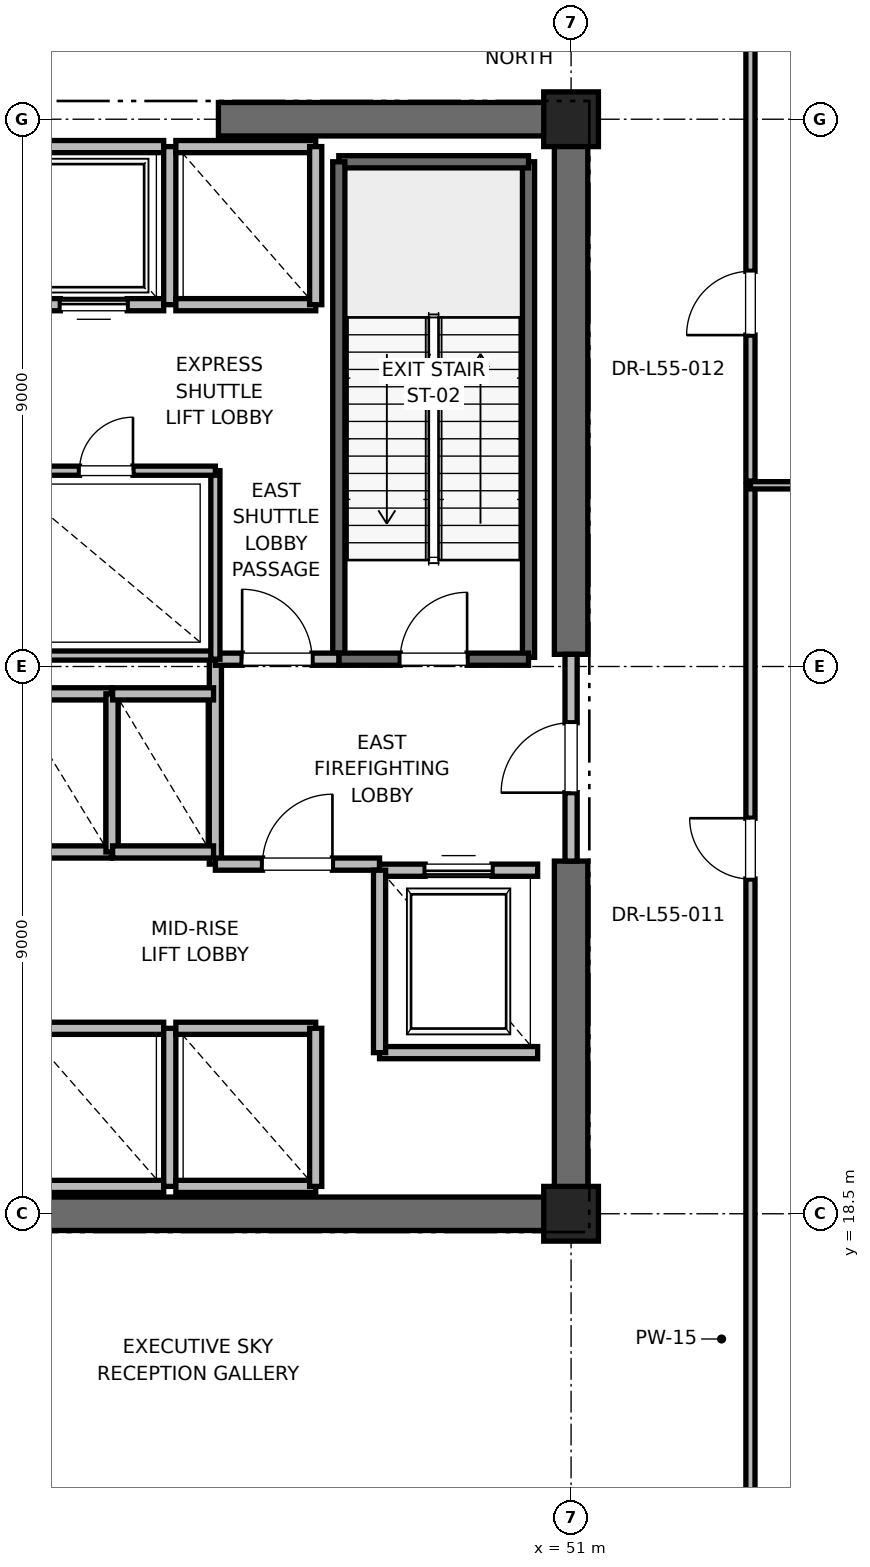
"""IFC4 building model, lengths in metres.
Left out: names, types, materials, properties, quantities, classifications, styles, units other than length and angle.
Written with IfcOpenShell. Run it as: python <this file> out.ifc"""

import sys

from ifc_helpers import new_model, si_unit, direction, frame, frame_2d, origin, origin_2d, place, context, subcontext, project, spatial, rectangle, extrude, element, fill, save


model = new_model("IFC4")
c1 = context("Model", 3, precision=1e-05, world=origin(), true_north=direction((0.0, 1.0)))
c2 = subcontext(c1, "Body", "Model", "MODEL_VIEW")
j1 = project(units=[si_unit("LENGTHUNIT", "METRE"), si_unit("PLANEANGLEUNIT", "RADIAN")], contexts=[c1])
p1 = place(None, origin())
s1 = spatial("IfcSite", under=j1, at=p1, CompositionType="ELEMENT")
p2 = place(p1, origin())
s2 = spatial("IfcBuilding", under=s1, at=p2, CompositionType="ELEMENT")
p3 = place(p2, frame((0.0, 0.0, 238.2)))
s3 = spatial("IfcBuildingStorey", under=s2, at=p3, CompositionType="ELEMENT", Elevation=238.2)
for number, where, z_axis, x_axis in (
    (1, (51.0, 18.5, 0.0), (0.0, 0.0, 1.0), (1.0, 0.0, 0.0)),
    (2, (51.0, 36.5, 0.0), (0.0, 0.0, 1.0), (1.0, 0.0, 0.0)),
):
    element("IfcColumn", number, at=place(p3, frame(where, z_axis=z_axis, x_axis=x_axis)), inside=s3, PredefinedType="PILASTER", context=c2, shape_type="SweptSolid", body=[
        extrude(rectangle(XDim=0.9, YDim=0.9, at=origin_2d()), origin(), (0.0, 0.0, 1.0), 5.0),
    ])
p4 = place(p3, frame((41.8, 18.5, 0.0), z_axis=(0.0, 0.0, 1.0), x_axis=(1.0, 0.0, 0.0)))
e3 = element("IfcWall", 3, at=p4, inside=s3, PredefinedType="SHEAR", context=c2, shape_type="SweptSolid", body=[
    extrude(rectangle(XDim=9.2, YDim=0.55, at=frame_2d((4.6, 0.0))), origin(), (0.0, 0.0, 1.0), 4.785),
])
for number, where, z_axis, x_axis in (
    (4, (45.2, 36.5, 0.0), (0.0, 0.0, 1.0), (1.0, 0.0, 0.0)),
    (5, (51.0, 18.5, 0.0), (0.0, 0.0, 1.0), (0.0, 1.0, 0.0)),
):
    element("IfcWall", number, at=place(p3, frame(where, z_axis=z_axis, x_axis=x_axis)), inside=s3, PredefinedType="SHEAR", context=c2, shape_type="SweptSolid", body=[
        extrude(rectangle(XDim=5.8, YDim=0.55, at=frame_2d((2.9, 0.0))), origin(), (0.0, 0.0, 1.0), 4.785),
    ])
p5 = place(p3, frame((51.0, 27.7, 0.0), z_axis=(0.0, 0.0, 1.0), x_axis=(0.0, 1.0, 0.0)))
e6 = element("IfcWall", 6, at=p5, inside=s3, PredefinedType="SHEAR", context=c2, shape_type="SweptSolid", body=[
    extrude(rectangle(XDim=8.8, YDim=0.55, at=frame_2d((4.4, 0.0))), origin(), (0.0, 0.0, 1.0), 4.785),
])
p6 = place(p3, frame((50.3, 27.65, 0.0), z_axis=(0.0, 0.0, 1.0), x_axis=(0.0, 1.0, 0.0)))
e7 = element("IfcWall", 7, at=p6, inside=s3, PredefinedType="SOLIDWALL", context=c2, shape_type="SweptSolid", body=[
    extrude(rectangle(XDim=8.15, YDim=0.2, at=frame_2d((4.075, 0.0))), origin(), (0.0, 0.0, 1.0), 4.785),
])
p7 = place(p3, frame((47.18, 35.8, 0.0), z_axis=(0.0, 0.0, 1.0), x_axis=(1.0, 0.0, 0.0)))
e8 = element("IfcWall", 8, at=p7, inside=s3, PredefinedType="SOLIDWALL", context=c2, shape_type="SweptSolid", body=[
    extrude(rectangle(XDim=3.12, YDim=0.2, at=frame_2d((1.56, 0.0))), origin(), (0.0, 0.0, 1.0), 4.785),
])
p8 = place(p3, frame((47.18, 27.62, 0.0), z_axis=(0.0, 0.0, 1.0), x_axis=(0.0, 1.0, 0.0)))
e9 = element("IfcWall", 9, at=p8, inside=s3, PredefinedType="SOLIDWALL", context=c2, shape_type="SweptSolid", body=[
    extrude(rectangle(XDim=8.18, YDim=0.2, at=frame_2d((4.09, 0.0))), origin(), (0.0, 0.0, 1.0), 4.785),
])
p9 = place(p3, frame((47.18, 27.62, 0.0), z_axis=(0.0, 0.0, 1.0), x_axis=(1.0, 0.0, 0.0)))
e10 = element("IfcWall", 10, at=p9, inside=s3, PredefinedType="SOLIDWALL", context=c2, shape_type="SweptSolid", body=[
    extrude(rectangle(XDim=3.12, YDim=0.2, at=frame_2d((1.56, 0.0))), origin(), (0.0, 0.0, 1.0), 4.785),
])
p10 = place(p9, frame((1.01, 0.0, 0.0)))
e11 = element("IfcOpeningElement", 11, at=p10, cuts=e10, PredefinedType="OPENING", context=c2, shape_type="SweptSolid", body=[
    extrude(rectangle(XDim=1.1, YDim=2.15, at=frame_2d((0.55, 1.075))), frame((0.0, 0.1, 0.0), z_axis=(0.0, -1.0, 0.0), x_axis=(1.0, 0.0, 0.0)), (0.0, 0.0, 1.0), 0.2),
])
p11 = place(p3, frame((45.15, 24.25, 0.0), z_axis=(0.0, 0.0, 1.0), x_axis=(0.0, 1.0, 0.0)))
e12 = element("IfcWall", 12, at=p11, inside=s3, PredefinedType="PARTITIONING", context=c2, shape_type="SweptSolid", body=[
    extrude(rectangle(XDim=3.37, YDim=0.2, at=frame_2d((1.685, 0.0))), origin(), (0.0, 0.0, 1.0), 4.785),
])
p12 = place(p3, frame((45.15, 24.25, 0.0), z_axis=(0.0, 0.0, 1.0), x_axis=(1.0, 0.0, 0.0)))
e13 = element("IfcWall", 13, at=p12, inside=s3, PredefinedType="PARTITIONING", context=c2, shape_type="SweptSolid", body=[
    extrude(rectangle(XDim=2.7, YDim=0.2, at=frame_2d((1.35, 0.0))), origin(), (0.0, 0.0, 1.0), 4.785),
])
p13 = place(p12, frame((0.775, 0.0, 0.0)))
e14 = element("IfcOpeningElement", 14, at=p13, cuts=e13, PredefinedType="OPENING", context=c2, shape_type="SweptSolid", body=[
    extrude(rectangle(XDim=1.15, YDim=2.2, at=frame_2d((0.575, 1.1))), frame((0.0, 0.1, 0.0), z_axis=(0.0, -1.0, 0.0), x_axis=(1.0, 0.0, 0.0)), (0.0, 0.0, 1.0), 0.2),
])
p14 = place(p3, frame((45.15, 27.62, 0.0), z_axis=(0.0, 0.0, 1.0), x_axis=(1.0, 0.0, 0.0)))
e15 = element("IfcWall", 15, at=p14, inside=s3, PredefinedType="PARTITIONING", context=c2, shape_type="SweptSolid", body=[
    extrude(rectangle(XDim=2.03, YDim=0.2, at=frame_2d((1.015, 0.0))), origin(), (0.0, 0.0, 1.0), 4.785),
])
p15 = place(p14, frame((0.44, 0.0, 0.0)))
e16 = element("IfcOpeningElement", 16, at=p15, cuts=e15, PredefinedType="OPENING", context=c2, shape_type="SweptSolid", body=[
    extrude(rectangle(XDim=1.15, YDim=2.2, at=frame_2d((0.575, 1.1))), frame((0.0, 0.1, 0.0), z_axis=(0.0, -1.0, 0.0), x_axis=(1.0, 0.0, 0.0)), (0.0, 0.0, 1.0), 0.2),
])
p16 = place(p3, frame((51.0, 24.3, 0.0), z_axis=(0.0, 0.0, 1.0), x_axis=(0.0, 1.0, 0.0)))
e17 = element("IfcWall", 17, at=p16, inside=s3, PredefinedType="PARTITIONING", context=c2, shape_type="SweptSolid", body=[
    extrude(rectangle(XDim=3.4, YDim=0.2, at=frame_2d((1.7, 0.0))), origin(), (0.0, 0.0, 1.0), 3.765),
])
p17 = place(p16, frame((1.125, 0.0, 0.0)))
e18 = element("IfcOpeningElement", 18, at=p17, cuts=e17, PredefinedType="OPENING", context=c2, shape_type="SweptSolid", body=[
    extrude(rectangle(XDim=1.15, YDim=2.2, at=frame_2d((0.575, 1.1))), frame((0.0, 0.1, 0.0), z_axis=(0.0, -1.0, 0.0), x_axis=(1.0, 0.0, 0.0)), (0.0, 0.0, 1.0), 0.2),
])
p18 = place(p3, frame((47.85, 21.15, 0.0), z_axis=(0.0, 0.0, 1.0), x_axis=(1.0, 0.0, 0.0)))
e19 = element("IfcWall", 19, at=p18, inside=s3, PredefinedType="SOLIDWALL", context=c2, shape_type="SweptSolid", body=[
    extrude(rectangle(XDim=2.6, YDim=0.2, at=frame_2d((1.3, 0.0))), origin(), (0.0, 0.0, 1.0), 4.785),
])
p19 = place(p3, frame((50.45, 24.15, 0.0), z_axis=(0.0, 0.0, 1.0), x_axis=(-1.0, 0.0, 0.0)))
e20 = element("IfcWall", 20, at=p19, inside=s3, PredefinedType="SOLIDWALL", context=c2, shape_type="SweptSolid", body=[
    extrude(rectangle(XDim=2.6, YDim=0.2, at=frame_2d((1.3, 0.0))), origin(), (0.0, 0.0, 1.0), 3.765),
])
p20 = place(p19, frame((0.75, 0.0, 0.0)))
e21 = element("IfcOpeningElement", 21, at=p20, cuts=e20, PredefinedType="OPENING", context=c2, shape_type="SweptSolid", body=[
    extrude(rectangle(XDim=1.1, YDim=2.2, at=frame_2d((0.55, 1.1))), frame((0.0, 0.1, 0.0), z_axis=(0.0, -1.0, 0.0), x_axis=(1.0, 0.0, 0.0)), (0.0, 0.0, 1.0), 0.2),
])
p21 = place(p3, frame((47.85, 24.15, 0.0), z_axis=(0.0, 0.0, 1.0), x_axis=(0.0, -1.0, 0.0)))
e22 = element("IfcWall", 22, at=p21, inside=s3, PredefinedType="SOLIDWALL", context=c2, shape_type="SweptSolid", body=[
    extrude(rectangle(XDim=3.0, YDim=0.2, at=frame_2d((1.5, 0.0))), origin(), (0.0, 0.0, 1.0), 4.785),
])
p22 = place(p3, frame((42.0, 18.95, 0.0), z_axis=(0.0, 0.0, 1.0), x_axis=(1.0, 0.0, 0.0)))
e23 = element("IfcWall", 23, at=p22, inside=s3, PredefinedType="SOLIDWALL", context=c2, shape_type="SweptSolid", body=[
    extrude(rectangle(XDim=2.3, YDim=0.2, at=frame_2d((1.15, 0.0))), origin(), (0.0, 0.0, 1.0), 3.765),
])
p23 = place(p3, frame((44.3, 21.55, 0.0), z_axis=(0.0, 0.0, 1.0), x_axis=(-1.0, 0.0, 0.0)))
e24 = element("IfcWall", 24, at=p23, inside=s3, PredefinedType="SOLIDWALL", context=c2, shape_type="SweptSolid", body=[
    extrude(rectangle(XDim=2.3, YDim=0.2, at=frame_2d((1.15, 0.0))), origin(), (0.0, 0.0, 1.0), 4.785),
])
p24 = place(p3, frame((44.4, 18.95, 0.0), z_axis=(0.0, 0.0, 1.0), x_axis=(0.0, 1.0, 0.0)))
e25 = element("IfcWall", 25, at=p24, inside=s3, PredefinedType="SOLIDWALL", context=c2, shape_type="SweptSolid", body=[
    extrude(rectangle(XDim=2.6, YDim=0.2, at=frame_2d((1.3, 0.0))), origin(), (0.0, 0.0, 1.0), 4.785),
])
for number, where, z_axis, x_axis in (
    (26, (44.5, 18.95, 0.0), (0.0, 0.0, 1.0), (1.0, 0.0, 0.0)),
    (27, (46.8, 21.55, 0.0), (0.0, 0.0, 1.0), (-1.0, 0.0, 0.0)),
):
    element("IfcWall", number, at=place(p3, frame(where, z_axis=z_axis, x_axis=x_axis)), inside=s3, PredefinedType="SOLIDWALL", context=c2, shape_type="SweptSolid", body=[
        extrude(rectangle(XDim=2.3, YDim=0.2, at=frame_2d((1.15, 0.0))), origin(), (0.0, 0.0, 1.0), 4.785),
    ])
p25 = place(p3, frame((46.8, 18.95, 0.0), z_axis=(0.0, 0.0, 1.0), x_axis=(0.0, 1.0, 0.0)))
e28 = element("IfcWall", 28, at=p25, inside=s3, PredefinedType="SOLIDWALL", context=c2, shape_type="SweptSolid", body=[
    extrude(rectangle(XDim=2.6, YDim=0.2, at=frame_2d((1.3, 0.0))), origin(), (0.0, 0.0, 1.0), 4.785),
])
for number, where, z_axis, x_axis in (
    (29, (41.76, 24.45, 0.0), (0.0, 0.0, 1.0), (1.0, 0.0, 0.0)),
    (30, (43.44, 27.05, 0.0), (0.0, 0.0, 1.0), (-1.0, 0.0, 0.0)),
):
    element("IfcWall", number, at=place(p3, frame(where, z_axis=z_axis, x_axis=x_axis)), inside=s3, PredefinedType="SOLIDWALL", context=c2, shape_type="SweptSolid", body=[
        extrude(rectangle(XDim=1.68, YDim=0.2, at=frame_2d((0.84, 0.0))), origin(), (0.0, 0.0, 1.0), 4.785),
    ])
p26 = place(p3, frame((43.45, 24.45, 0.0), z_axis=(0.0, 0.0, 1.0), x_axis=(0.0, 1.0, 0.0)))
e31 = element("IfcWall", 31, at=p26, inside=s3, PredefinedType="SOLIDWALL", context=c2, shape_type="SweptSolid", body=[
    extrude(rectangle(XDim=2.6, YDim=0.2, at=frame_2d((1.3, 0.0))), origin(), (0.0, 0.0, 1.0), 4.785),
])
for number, where, z_axis, x_axis in (
    (32, (43.46, 24.45, 0.0), (0.0, 0.0, 1.0), (1.0, 0.0, 0.0)),
    (33, (45.12, 27.05, 0.0), (0.0, 0.0, 1.0), (-1.0, 0.0, 0.0)),
):
    element("IfcWall", number, at=place(p3, frame(where, z_axis=z_axis, x_axis=x_axis)), inside=s3, PredefinedType="SOLIDWALL", context=c2, shape_type="SweptSolid", body=[
        extrude(rectangle(XDim=1.66, YDim=0.2, at=frame_2d((0.83, 0.0))), origin(), (0.0, 0.0, 1.0), 4.785),
    ])
p27 = place(p3, frame((42.0, 33.45, 0.0), z_axis=(0.0, 0.0, 1.0), x_axis=(1.0, 0.0, 0.0)))
e34 = element("IfcWall", 34, at=p27, inside=s3, PredefinedType="SOLIDWALL", context=c2, shape_type="SweptSolid", body=[
    extrude(rectangle(XDim=2.3, YDim=0.2, at=frame_2d((1.15, 0.0))), origin(), (0.0, 0.0, 1.0), 4.785),
])
p28 = place(p27, frame((0.6, 0.0, 0.0)))
e35 = element("IfcOpeningElement", 35, at=p28, cuts=e34, PredefinedType="OPENING", context=c2, shape_type="SweptSolid", body=[
    extrude(rectangle(XDim=1.1, YDim=2.2, at=frame_2d((0.55, 1.1))), frame((0.0, 0.1, 0.0), z_axis=(0.0, -1.0, 0.0), x_axis=(1.0, 0.0, 0.0)), (0.0, 0.0, 1.0), 0.2),
])
p29 = place(p3, frame((44.3, 36.05, 0.0), z_axis=(0.0, 0.0, 1.0), x_axis=(-1.0, 0.0, 0.0)))
e36 = element("IfcWall", 36, at=p29, inside=s3, PredefinedType="SOLIDWALL", context=c2, shape_type="SweptSolid", body=[
    extrude(rectangle(XDim=2.3, YDim=0.2, at=frame_2d((1.15, 0.0))), origin(), (0.0, 0.0, 1.0), 3.765),
])
p30 = place(p3, frame((44.4, 33.45, 0.0), z_axis=(0.0, 0.0, 1.0), x_axis=(0.0, 1.0, 0.0)))
e37 = element("IfcWall", 37, at=p30, inside=s3, PredefinedType="SOLIDWALL", context=c2, shape_type="SweptSolid", body=[
    extrude(rectangle(XDim=2.6, YDim=0.2, at=frame_2d((1.3, 0.0))), origin(), (0.0, 0.0, 1.0), 3.765),
])
p31 = place(p3, frame((44.5, 33.45, 0.0), z_axis=(0.0, 0.0, 1.0), x_axis=(1.0, 0.0, 0.0)))
e38 = element("IfcWall", 38, at=p31, inside=s3, PredefinedType="SOLIDWALL", context=c2, shape_type="SweptSolid", body=[
    extrude(rectangle(XDim=2.3, YDim=0.2, at=frame_2d((1.15, 0.0))), origin(), (0.0, 0.0, 1.0), 4.785),
])
p32 = place(p3, frame((46.8, 36.05, 0.0), z_axis=(0.0, 0.0, 1.0), x_axis=(-1.0, 0.0, 0.0)))
e39 = element("IfcWall", 39, at=p32, inside=s3, PredefinedType="SOLIDWALL", context=c2, shape_type="SweptSolid", body=[
    extrude(rectangle(XDim=2.3, YDim=0.2, at=frame_2d((1.15, 0.0))), origin(), (0.0, 0.0, 1.0), 3.765),
])
p33 = place(p3, frame((46.8, 33.45, 0.0), z_axis=(0.0, 0.0, 1.0), x_axis=(0.0, 1.0, 0.0)))
e40 = element("IfcWall", 40, at=p33, inside=s3, PredefinedType="SOLIDWALL", context=c2, shape_type="SweptSolid", body=[
    extrude(rectangle(XDim=2.6, YDim=0.2, at=frame_2d((1.3, 0.0))), origin(), (0.0, 0.0, 1.0), 4.785),
])
p34 = place(p3, frame((41.56, 27.68, 0.0), z_axis=(0.0, 0.0, 1.0), x_axis=(1.0, 0.0, 0.0)))
e41 = element("IfcWall", 41, at=p34, inside=s3, PredefinedType="PARTITIONING", context=c2, shape_type="SweptSolid", body=[
    extrude(rectangle(XDim=3.59, YDim=0.15, at=frame_2d((1.795, 0.0))), origin(), (0.0, 0.0, 1.0), 2.85),
])
p35 = place(p3, frame((45.15, 27.62, 0.0), z_axis=(0.0, 0.0, 1.0), x_axis=(0.0, 1.0, 0.0)))
e42 = element("IfcWall", 42, at=p35, inside=s3, PredefinedType="PARTITIONING", context=c2, shape_type="SweptSolid", body=[
    extrude(rectangle(XDim=3.1, YDim=0.15, at=frame_2d((1.55, 0.0))), origin(), (0.0, 0.0, 1.0), 2.85),
])
p36 = place(p3, frame((41.56, 30.72, 0.0), z_axis=(0.0, 0.0, 1.0), x_axis=(1.0, 0.0, 0.0)))
e43 = element("IfcWall", 43, at=p36, inside=s3, PredefinedType="PARTITIONING", context=c2, shape_type="SweptSolid", body=[
    extrude(rectangle(XDim=3.59, YDim=0.15, at=frame_2d((1.795, 0.0))), origin(), (0.0, 0.0, 1.0), 2.85),
])
p37 = place(p36, frame((1.355, 0.0, 0.0)))
e44 = element("IfcOpeningElement", 44, at=p37, cuts=e43, PredefinedType="OPENING", context=c2, shape_type="SweptSolid", body=[
    extrude(rectangle(XDim=0.88, YDim=2.1, at=frame_2d((0.44, 1.05))), frame((0.0, 0.075, 0.0), z_axis=(0.0, -1.0, 0.0), x_axis=(1.0, 0.0, 0.0)), (0.0, 0.0, 1.0), 0.15),
])
p38 = place(p3, frame((53.95, 8.877, 0.0), z_axis=(0.0, 0.0, 1.0), x_axis=(0.0, 1.0, 0.0)))
e45 = element("IfcWall", 45, at=p38, inside=s3, PredefinedType="PARTITIONING", context=c2, shape_type="SweptSolid", body=[
    extrude(rectangle(XDim=21.603, YDim=0.15, at=frame_2d((10.802, 0.0))), origin(), (0.0, 0.0, 1.0), 2.85),
])
p39 = place(p38, frame((15.128, 0.0, 0.0)))
e46 = element("IfcOpeningElement", 46, at=p39, cuts=e45, PredefinedType="OPENING", context=c2, shape_type="SweptSolid", body=[
    extrude(rectangle(XDim=1.0, YDim=2.15, at=frame_2d((0.5, 1.075))), frame((0.0, 0.075, 0.0), z_axis=(0.0, -1.0, 0.0), x_axis=(1.0, 0.0, 0.0)), (0.0, 0.0, 1.0), 0.15),
])
p40 = place(p3, frame((53.95, 30.48, 0.0), z_axis=(0.0, 0.0, 1.0), x_axis=(1.0, 0.0, 0.0)))
e47 = element("IfcWall", 47, at=p40, inside=s3, PredefinedType="PARTITIONING", context=c2, shape_type="SweptSolid", body=[
    extrude(rectangle(XDim=12.171, YDim=0.12, at=frame_2d((6.085, 0.0))), origin(), (0.0, 0.0, 1.0), 2.85),
])
p41 = place(p3, frame((53.95, 30.55, 0.0), z_axis=(0.0, 0.0, 1.0), x_axis=(0.0, 1.0, 0.0)))
e48 = element("IfcWall", 48, at=p41, inside=s3, PredefinedType="PARTITIONING", context=c2, shape_type="SweptSolid", body=[
    extrude(rectangle(XDim=15.573, YDim=0.15, at=frame_2d((7.787, 0.0))), origin(), (0.0, 0.0, 1.0), 2.85),
])
p42 = place(p41, frame((2.4, 0.0, 0.0)))
e49 = element("IfcOpeningElement", 49, at=p42, cuts=e48, PredefinedType="OPENING", context=c2, shape_type="SweptSolid", body=[
    extrude(rectangle(XDim=1.05, YDim=2.2, at=frame_2d((0.525, 1.1))), frame((0.0, 0.075, 0.0), z_axis=(0.0, -1.0, 0.0), x_axis=(1.0, 0.0, 0.0)), (0.0, 0.0, 1.0), 0.15),
])
p43 = place(p10, origin())
e50 = element("IfcDoor", 50, at=p43, inside=s3, OperationType="SINGLE_SWING_RIGHT", PredefinedType="DOOR", context=c2, shape_type="SweptSolid", body=[
    extrude(rectangle(XDim=1.1, YDim=2.15, at=frame_2d((0.55, 1.075))), frame((0.0, 0.025, 0.0), z_axis=(0.0, -1.0, 0.0), x_axis=(1.0, 0.0, 0.0)), (0.0, 0.0, 1.0), 0.05),
])
fill(e11, e50)
p44 = place(p13, origin())
e51 = element("IfcDoor", 51, at=p44, inside=s3, OperationType="SINGLE_SWING_RIGHT", PredefinedType="DOOR", context=c2, shape_type="SweptSolid", body=[
    extrude(rectangle(XDim=1.15, YDim=2.2, at=frame_2d((0.575, 1.1))), frame((0.0, 0.025, 0.0), z_axis=(0.0, -1.0, 0.0), x_axis=(1.0, 0.0, 0.0)), (0.0, 0.0, 1.0), 0.05),
])
fill(e14, e51)
p45 = place(p15, origin())
e52 = element("IfcDoor", 52, at=p45, inside=s3, OperationType="SINGLE_SWING_LEFT", PredefinedType="DOOR", context=c2, shape_type="SweptSolid", body=[
    extrude(rectangle(XDim=1.15, YDim=2.2, at=frame_2d((0.575, 1.1))), frame((0.0, 0.025, 0.0), z_axis=(0.0, -1.0, 0.0), x_axis=(1.0, 0.0, 0.0)), (0.0, 0.0, 1.0), 0.05),
])
fill(e16, e52)
p46 = place(p17, origin())
e53 = element("IfcDoor", 53, at=p46, inside=s3, OperationType="SINGLE_SWING_LEFT", PredefinedType="DOOR", context=c2, shape_type="SweptSolid", body=[
    extrude(rectangle(XDim=1.15, YDim=2.2, at=frame_2d((0.575, 1.1))), frame((0.0, 0.025, 0.0), z_axis=(0.0, -1.0, 0.0), x_axis=(1.0, 0.0, 0.0)), (0.0, 0.0, 1.0), 0.05),
])
fill(e18, e53)
p47 = place(p20, origin())
e54 = element("IfcDoor", 54, at=p47, inside=s3, OperationType="SLIDING_TO_RIGHT", PredefinedType="DOOR", context=c2, shape_type="SweptSolid", body=[
    extrude(rectangle(XDim=1.1, YDim=2.2, at=frame_2d((0.55, 1.1))), frame((0.0, 0.025, 0.0), z_axis=(0.0, -1.0, 0.0), x_axis=(1.0, 0.0, 0.0)), (0.0, 0.0, 1.0), 0.05),
])
fill(e21, e54)
p48 = place(p28, origin())
e55 = element("IfcDoor", 55, at=p48, inside=s3, OperationType="SLIDING_TO_RIGHT", PredefinedType="DOOR", context=c2, shape_type="SweptSolid", body=[
    extrude(rectangle(XDim=1.1, YDim=2.2, at=frame_2d((0.55, 1.1))), frame((0.0, 0.025, 0.0), z_axis=(0.0, -1.0, 0.0), x_axis=(1.0, 0.0, 0.0)), (0.0, 0.0, 1.0), 0.05),
])
fill(e35, e55)
p49 = place(p37, origin())
e56 = element("IfcDoor", 56, at=p49, inside=s3, OperationType="SINGLE_SWING_RIGHT", PredefinedType="DOOR", context=c2, shape_type="SweptSolid", body=[
    extrude(rectangle(XDim=0.88, YDim=2.1, at=frame_2d((0.44, 1.05))), frame((0.0, 0.025, 0.0), z_axis=(0.0, -1.0, 0.0), x_axis=(1.0, 0.0, 0.0)), (0.0, 0.0, 1.0), 0.05),
])
fill(e44, e56)
p50 = place(p39, origin())
e57 = element("IfcDoor", 57, at=p50, inside=s3, OperationType="SINGLE_SWING_RIGHT", PredefinedType="DOOR", context=c2, shape_type="SweptSolid", body=[
    extrude(rectangle(XDim=1.0, YDim=2.15, at=frame_2d((0.5, 1.075))), frame((0.0, 0.025, 0.0), z_axis=(0.0, -1.0, 0.0), x_axis=(1.0, 0.0, 0.0)), (0.0, 0.0, 1.0), 0.05),
])
fill(e46, e57)
p51 = place(p42, origin())
e58 = element("IfcDoor", 58, at=p51, inside=s3, OperationType="SINGLE_SWING_LEFT", PredefinedType="DOOR", context=c2, shape_type="SweptSolid", body=[
    extrude(rectangle(XDim=1.05, YDim=2.2, at=frame_2d((0.525, 1.1))), frame((0.0, 0.025, 0.0), z_axis=(0.0, -1.0, 0.0), x_axis=(1.0, 0.0, 0.0)), (0.0, 0.0, 1.0), 0.05),
])
fill(e49, e58)
save(model, sys.argv[1])
